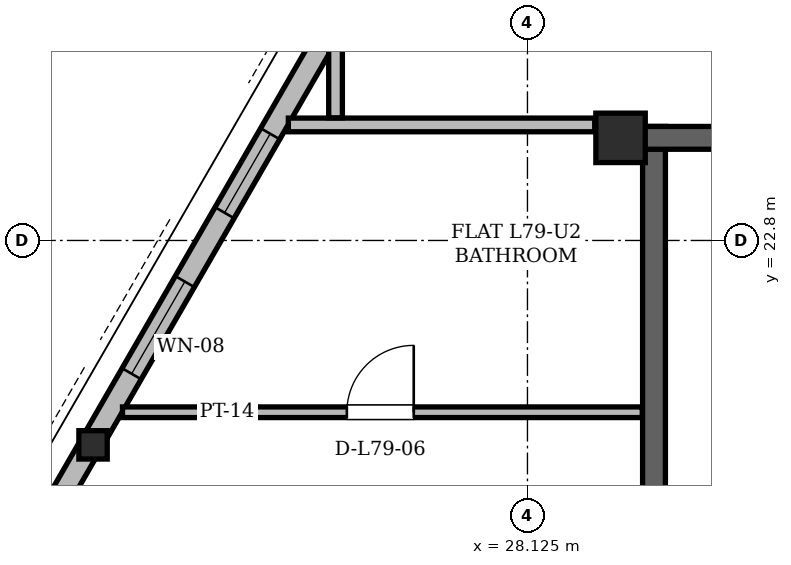
"""IFC4 building model, lengths in metres.
Left out: names, types, materials, properties, quantities, classifications, styles, units other than length and angle.
Written with IfcOpenShell. Run it as: python <this file> out.ifc"""

import sys

from ifc_helpers import new_model, si_unit, direction, frame, frame_2d, origin, origin_2d, place, context, subcontext, project, spatial, rectangle, hollow_rectangle, i_section, extrude, element, fill, save


model = new_model("IFC4")
c1 = context("Model", 3, precision=1e-05, world=origin(), true_north=direction((0.0, 1.0)))
c2 = subcontext(c1, "Body", "Model", "MODEL_VIEW")
j1 = project(units=[si_unit("LENGTHUNIT", "METRE"), si_unit("PLANEANGLEUNIT", "RADIAN")], contexts=[c1])
p1 = place(None, origin())
s1 = spatial("IfcSite", under=j1, at=p1, CompositionType="ELEMENT")
p2 = place(p1, origin())
s2 = spatial("IfcBuilding", under=s1, at=p2, CompositionType="ELEMENT")
p3 = place(p2, frame((0.0, 0.0, 301.2)))
s3 = spatial("IfcBuildingStorey", under=s2, at=p3, CompositionType="ELEMENT", Elevation=301.2)
p4 = place(p3, frame((29.35, 24.15, 0.0), z_axis=(0.0, 0.0, 1.0), x_axis=(1.0, 0.0, 0.0)))
e1 = element("IfcColumn", 1, at=p4, inside=s3, PredefinedType="COLUMN", context=c2, shape_type="SweptSolid", body=[
    extrude(hollow_rectangle(XDim=0.65, YDim=0.65, WallThickness=0.05, at=origin_2d()), origin(), (0.0, 0.0, 1.0), 3.9),
])
p5 = place(p3, frame((22.387, 20.129, 0.005), z_axis=(0.011293284305, -0.009097367912, 0.999894844284), x_axis=(0.627329537873, 0.778753909083, 0.0)))
e2 = element("IfcColumn", 2, at=p5, inside=s3, PredefinedType="COLUMN", context=c2, shape_type="SweptSolid", body=[
    extrude(i_section(OverallWidth=0.373, OverallDepth=0.373, WebThickness=0.016, FlangeThickness=0.026, at=origin_2d()), origin(), (0.0, 0.0, 1.0), 3.891),
])
p6 = place(p3, frame((29.79, 11.0, 0.0), z_axis=(0.0, 0.0, 1.0), x_axis=(0.0, 1.0, 0.0)))
e3 = element("IfcWall", 3, at=p6, inside=s3, PredefinedType="SHEAR", context=c2, shape_type="SweptSolid", body=[
    extrude(rectangle(XDim=13.3, YDim=0.3, at=frame_2d((6.65, 0.0))), origin(), (0.0, 0.0, 1.0), 3.68),
])
p7 = place(p3, frame((29.65, 24.15, 0.0), z_axis=(0.0, 0.0, 1.0), x_axis=(1.0, 0.0, 0.0)))
e4 = element("IfcWall", 4, at=p7, inside=s3, PredefinedType="SHEAR", context=c2, shape_type="SweptSolid", body=[
    extrude(rectangle(XDim=15.7, YDim=0.3, at=frame_2d((7.85, 0.0))), origin(), (0.0, 0.0, 1.0), 3.68),
])
p8 = place(p7, frame((1.7, 0.0, 0.0)))
e5 = element("IfcOpeningElement", 5, at=p8, cuts=e4, PredefinedType="OPENING", context=c2, shape_type="SweptSolid", body=[
    extrude(rectangle(XDim=1.2, YDim=2.2, at=frame_2d((0.6, 1.1))), frame((0.0, 0.15, 0.0), z_axis=(0.0, -1.0, 0.0), x_axis=(1.0, 0.0, 0.0)), (0.0, 0.0, 1.0), 0.3),
])
p9 = place(p7, frame((12.8, 0.0, 0.0)))
e6 = element("IfcOpeningElement", 6, at=p9, cuts=e4, PredefinedType="OPENING", context=c2, shape_type="SweptSolid", body=[
    extrude(rectangle(XDim=1.2, YDim=2.2, at=frame_2d((0.6, 1.1))), frame((0.0, 0.15, 0.0), z_axis=(0.0, -1.0, 0.0), x_axis=(1.0, 0.0, 0.0)), (0.0, 0.0, 1.0), 0.3),
])
p10 = place(p7, frame((7.4, 0.0, 0.0)))
e7 = element("IfcOpeningElement", 7, at=p10, cuts=e4, PredefinedType="OPENING", context=c2, shape_type="SweptSolid", body=[
    extrude(rectangle(XDim=0.9, YDim=2.05, at=frame_2d((0.45, 1.025))), frame((0.0, 0.15, 0.0), z_axis=(0.0, -1.0, 0.0), x_axis=(1.0, 0.0, 0.0)), (0.0, 0.0, 1.0), 0.3),
])
p11 = place(p3, frame((35.568, 42.958, 0.0), z_axis=(0.0, 0.0, 1.0), x_axis=(-0.499999872078, -0.86602547764, 0.0)))
e8 = element("IfcWall", 8, at=p11, inside=s3, PredefinedType="SOLIDWALL", context=c2, shape_type="SweptSolid", body=[
    extrude(rectangle(XDim=37.658, YDim=0.29, at=frame_2d((18.829, 0.0))), origin(), (0.0, 0.0, 1.0), 3.058),
])
p12 = place(p11, frame((8.034, 0.0, 0.0)))
e9 = element("IfcOpeningElement", 9, at=p12, cuts=e8, PredefinedType="OPENING", context=c2, shape_type="SweptSolid", body=[
    extrude(rectangle(XDim=1.5, YDim=2.2, at=frame_2d((0.75, 1.1))), frame((0.0, 0.145, 0.0), z_axis=(0.0, -1.0, 0.0), x_axis=(1.0, 0.0, 0.0)), (0.0, 0.0, 1.0), 0.29),
])
p13 = place(p11, frame((32.518, 0.0, 0.0)))
e10 = element("IfcOpeningElement", 10, at=p13, cuts=e8, PredefinedType="OPENING", context=c2, shape_type="SweptSolid", body=[
    extrude(rectangle(XDim=1.5, YDim=2.2, at=frame_2d((0.75, 1.1))), frame((0.0, 0.145, 0.0), z_axis=(0.0, -1.0, 0.0), x_axis=(1.0, 0.0, 0.0)), (0.0, 0.0, 1.0), 0.29),
])
p14 = place(p11, frame((27.303, 0.0, 0.85)))
e11 = element("IfcOpeningElement", 11, at=p14, cuts=e8, PredefinedType="OPENING", context=c2, shape_type="SweptSolid", body=[
    extrude(rectangle(XDim=2.2, YDim=1.85, at=frame_2d((1.1, 0.925))), frame((0.0, 0.145, 0.0), z_axis=(0.0, -1.0, 0.0), x_axis=(1.0, 0.0, 0.0)), (0.0, 0.0, 1.0), 0.29),
])
p15 = place(p11, frame((34.437, 0.0, 0.85)))
e12 = element("IfcOpeningElement", 12, at=p15, cuts=e8, PredefinedType="OPENING", context=c2, shape_type="SweptSolid", body=[
    extrude(rectangle(XDim=1.6, YDim=1.7, at=frame_2d((0.8, 0.85))), frame((0.0, 0.145, 0.0), z_axis=(0.0, -1.0, 0.0), x_axis=(1.0, 0.0, 0.0)), (0.0, 0.0, 1.0), 0.29),
])
p16 = place(p11, frame((21.655, 0.0, 0.85)))
e13 = element("IfcOpeningElement", 13, at=p16, cuts=e8, PredefinedType="OPENING", context=c2, shape_type="SweptSolid", body=[
    extrude(rectangle(XDim=1.2, YDim=1.48, at=frame_2d((0.6, 0.74))), frame((0.0, 0.145, 0.0), z_axis=(0.0, -1.0, 0.0), x_axis=(1.0, 0.0, 0.0)), (0.0, 0.0, 1.0), 0.29),
])
p17 = place(p11, frame((23.901, 0.0, 0.85)))
e14 = element("IfcOpeningElement", 14, at=p17, cuts=e8, PredefinedType="OPENING", context=c2, shape_type="SweptSolid", body=[
    extrude(rectangle(XDim=1.4, YDim=1.6, at=frame_2d((0.7, 0.8))), frame((0.0, 0.145, 0.0), z_axis=(0.0, -1.0, 0.0), x_axis=(1.0, 0.0, 0.0)), (0.0, 0.0, 1.0), 0.29),
])
p18 = place(p11, frame((15.246, 0.0, 0.85)))
e15 = element("IfcOpeningElement", 15, at=p18, cuts=e8, PredefinedType="OPENING", context=c2, shape_type="SweptSolid", body=[
    extrude(rectangle(XDim=2.6, YDim=1.95, at=frame_2d((1.3, 0.975))), frame((0.0, 0.145, 0.0), z_axis=(0.0, -1.0, 0.0), x_axis=(1.0, 0.0, 0.0)), (0.0, 0.0, 1.0), 0.29),
])
p19 = place(p11, frame((1.164, 0.0, 0.85)))
e16 = element("IfcOpeningElement", 16, at=p19, cuts=e8, PredefinedType="OPENING", context=c2, shape_type="SweptSolid", body=[
    extrude(rectangle(XDim=1.2, YDim=1.48, at=frame_2d((0.6, 0.74))), frame((0.0, 0.145, 0.0), z_axis=(0.0, -1.0, 0.0), x_axis=(1.0, 0.0, 0.0)), (0.0, 0.0, 1.0), 0.29),
])
p20 = place(p3, frame((22.797, 20.54, 0.0), z_axis=(0.0, 0.0, 1.0), x_axis=(1.0, 0.0, 0.0)))
e17 = element("IfcWall", 17, at=p20, inside=s3, PredefinedType="PARTITIONING", context=c2, shape_type="SweptSolid", body=[
    extrude(rectangle(XDim=6.839, YDim=0.14, at=frame_2d((3.419, 0.0))), origin(), (0.0, 0.0, 1.0), 2.82),
])
p21 = place(p20, frame((2.952, 0.0, 0.0)))
e18 = element("IfcOpeningElement", 18, at=p21, cuts=e17, PredefinedType="OPENING", context=c2, shape_type="SweptSolid", body=[
    extrude(rectangle(XDim=0.88, YDim=2.08, at=frame_2d((0.44, 1.04))), frame((0.0, 0.07, 0.0), z_axis=(0.0, -1.0, 0.0), x_axis=(1.0, 0.0, 0.0)), (0.0, 0.0, 1.0), 0.14),
])
p22 = place(p3, frame((24.979, 24.32, 0.0), z_axis=(0.0, 0.0, 1.0), x_axis=(1.0, 0.0, 0.0)))
e19 = element("IfcWall", 19, at=p22, inside=s3, PredefinedType="PARTITIONING", context=c2, shape_type="SweptSolid", body=[
    extrude(rectangle(XDim=4.031, YDim=0.18, at=frame_2d((2.015, 0.0))), origin(), (0.0, 0.0, 1.0), 3.68),
])
p23 = place(p3, frame((25.6, 24.414, 0.0), z_axis=(0.0, 0.0, 1.0), x_axis=(0.0, 1.0, 0.0)))
e20 = element("IfcWall", 20, at=p23, inside=s3, PredefinedType="PARTITIONING", context=c2, shape_type="SweptSolid", body=[
    extrude(rectangle(XDim=0.981, YDim=0.18, at=frame_2d((0.49, 0.0))), origin(), (0.0, 0.0, 1.0), 3.058),
])
p24 = place(p16, origin())
e21 = element("IfcWindow", 21, at=p24, inside=s3, PartitioningType="SINGLE_PANEL", PredefinedType="WINDOW", context=c2, shape_type="SweptSolid", body=[
    extrude(rectangle(XDim=1.2, YDim=1.48, at=frame_2d((0.6, 0.74))), frame((0.0, 0.03, 0.0), z_axis=(0.0, -1.0, 0.0), x_axis=(1.0, 0.0, 0.0)), (0.0, 0.0, 1.0), 0.06),
])
fill(e13, e21)
p25 = place(p17, origin())
e22 = element("IfcWindow", 22, at=p25, inside=s3, PartitioningType="SINGLE_PANEL", PredefinedType="WINDOW", context=c2, shape_type="SweptSolid", body=[
    extrude(rectangle(XDim=1.4, YDim=1.6, at=frame_2d((0.7, 0.8))), frame((0.0, 0.03, 0.0), z_axis=(0.0, -1.0, 0.0), x_axis=(1.0, 0.0, 0.0)), (0.0, 0.0, 1.0), 0.06),
])
fill(e14, e22)
p26 = place(p21, origin())
e23 = element("IfcDoor", 23, at=p26, inside=s3, OperationType="SINGLE_SWING_RIGHT", PredefinedType="DOOR", context=c2, shape_type="SweptSolid", body=[
    extrude(rectangle(XDim=0.88, YDim=2.08, at=frame_2d((0.44, 1.04))), frame((0.0, 0.025, 0.0), z_axis=(0.0, -1.0, 0.0), x_axis=(1.0, 0.0, 0.0)), (0.0, 0.0, 1.0), 0.05),
])
fill(e18, e23)
save(model, sys.argv[1])
